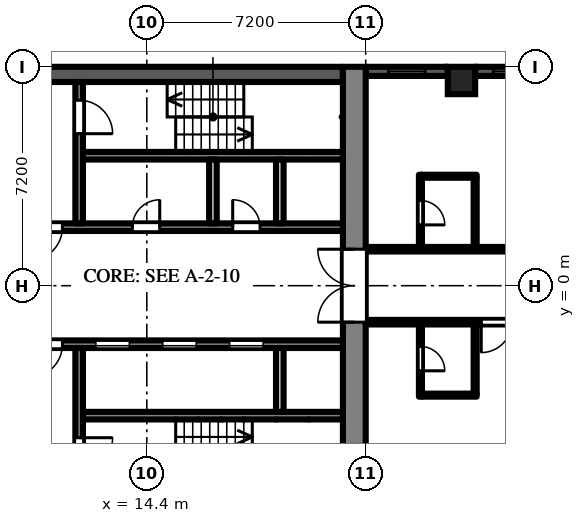
"""IFC4 building model, lengths in metres.
Left out: names, types, materials, properties, quantities, classifications, styles, units other than length and angle.
Written with IfcOpenShell. Run it as: python <this file> out.ifc"""

import sys

from ifc_helpers import new_model, si_unit, direction, frame, frame_2d, origin, origin_2d, place, context, subcontext, project, spatial, rectangle, extrude, element, fill, save


model = new_model("IFC4")
c1 = context("Model", 3, precision=1e-05, world=origin(), true_north=direction((0.0, 1.0)))
c2 = subcontext(c1, "Body", "Model", "MODEL_VIEW")
j1 = project(units=[si_unit("LENGTHUNIT", "METRE"), si_unit("PLANEANGLEUNIT", "RADIAN")], contexts=[c1])
p1 = place(None, origin())
s1 = spatial("IfcSite", under=j1, at=p1, CompositionType="ELEMENT")
p2 = place(p1, origin())
s2 = spatial("IfcBuilding", under=s1, at=p2, CompositionType="ELEMENT")
p3 = place(p2, frame((0.0, 0.0, 59.7)))
s3 = spatial("IfcBuildingStorey", under=s2, at=p3, CompositionType="ELEMENT", Elevation=59.7)
p4 = place(p3, frame((24.75, 6.75, 0.0), z_axis=(0.0, 0.0, 1.0), x_axis=(1.0, 0.0, 0.0)))
e1 = element("IfcColumn", 1, at=p4, inside=s3, PredefinedType="COLUMN", context=c2, shape_type="SweptSolid", body=[
    extrude(rectangle(XDim=0.9, YDim=0.9, at=origin_2d()), origin(), (0.0, 0.0, 1.0), 3.0),
])
p5 = place(p3, frame((28.35, 7.05, 0.0), z_axis=(0.0, 0.0, 1.0), x_axis=(-1.0, 0.0, 0.0)))
e2 = element("IfcWall", 2, at=p5, inside=s3, PredefinedType="SOLIDWALL", context=c2, shape_type="SweptSolid", body=[
    extrude(rectangle(XDim=3.15, YDim=0.3, at=frame_2d((1.575, 0.0))), origin(), (0.0, 0.0, 1.0), 2.1),
])
p6 = place(p5, frame((0.15, 0.0, 0.2)))
e3 = element("IfcOpeningElement", 3, at=p6, cuts=e2, PredefinedType="OPENING", context=c2, shape_type="SweptSolid", body=[
    extrude(rectangle(XDim=2.4, YDim=1.85, at=frame_2d((1.2, 0.925))), frame((0.0, 0.16, 0.0), z_axis=(0.0, -1.0, 0.0), x_axis=(1.0, 0.0, 0.0)), (0.0, 0.0, 1.0), 0.32),
])
p7 = place(p3, frame((24.3, 7.05, 0.0), z_axis=(0.0, 0.0, 1.0), x_axis=(-1.0, 0.0, 0.0)))
e4 = element("IfcWall", 4, at=p7, inside=s3, PredefinedType="SOLIDWALL", context=c2, shape_type="SweptSolid", body=[
    extrude(rectangle(XDim=2.7, YDim=0.3, at=frame_2d((1.35, 0.0))), origin(), (0.0, 0.0, 1.0), 2.1),
])
p8 = place(p7, frame((0.75, 0.0, 0.2)))
e5 = element("IfcOpeningElement", 5, at=p8, cuts=e4, PredefinedType="OPENING", context=c2, shape_type="SweptSolid", body=[
    extrude(rectangle(XDim=1.2, YDim=1.85, at=frame_2d((0.6, 0.925))), frame((0.0, 0.16, 0.0), z_axis=(0.0, -1.0, 0.0), x_axis=(1.0, 0.0, 0.0)), (0.0, 0.0, 1.0), 0.32),
])
p9 = place(p3, frame((21.225, -7.2, 0.0), z_axis=(0.0, 0.0, 1.0), x_axis=(0.0, 1.0, 0.0)))
e6 = element("IfcWall", 6, at=p9, inside=s3, PredefinedType="SHEAR", context=c2, shape_type="SweptSolid", body=[
    extrude(rectangle(XDim=14.4, YDim=0.75, at=frame_2d((7.2, 0.0))), origin(), (0.0, 0.0, 1.0), 2.55),
])
p10 = place(p9, frame((6.0, 0.0, 0.0)))
e7 = element("IfcOpeningElement", 7, at=p10, cuts=e6, PredefinedType="OPENING", context=c2, shape_type="SweptSolid", body=[
    extrude(rectangle(XDim=2.4, YDim=2.2, at=frame_2d((1.2, 1.1))), frame((0.0, 0.385, 0.0), z_axis=(0.0, -1.0, 0.0), x_axis=(1.0, 0.0, 0.0)), (0.0, 0.0, 1.0), 0.77),
])
p11 = place(p3, frame((7.9, 6.95, 0.0), z_axis=(0.0, 0.0, 1.0), x_axis=(1.0, 0.0, 0.0)))
e8 = element("IfcWall", 8, at=p11, inside=s3, PredefinedType="SHEAR", context=c2, shape_type="SweptSolid", body=[
    extrude(rectangle(XDim=12.95, YDim=0.5, at=frame_2d((6.475, 0.0))), origin(), (0.0, 0.0, 1.0), 2.55),
])
p12 = place(p3, frame((7.9, 1.925, 0.0), z_axis=(0.0, 0.0, 1.0), x_axis=(1.0, 0.0, 0.0)))
e9 = element("IfcWall", 9, at=p12, inside=s3, PredefinedType="SHEAR", context=c2, shape_type="SweptSolid", body=[
    extrude(rectangle(XDim=12.95, YDim=0.25, at=frame_2d((6.475, 0.0))), origin(), (0.0, 0.0, 1.0), 2.55),
])
p13 = place(p12, frame((0.525, 0.0, 0.0)))
e10 = element("IfcOpeningElement", 10, at=p13, cuts=e9, PredefinedType="OPENING", context=c2, shape_type="SweptSolid", body=[
    extrude(rectangle(XDim=0.9, YDim=2.1, at=frame_2d((0.45, 1.05))), frame((0.0, 0.135, 0.0), z_axis=(0.0, -1.0, 0.0), x_axis=(1.0, 0.0, 0.0)), (0.0, 0.0, 1.0), 0.27),
])
p14 = place(p12, frame((2.625, 0.0, 0.0)))
e11 = element("IfcOpeningElement", 11, at=p14, cuts=e9, PredefinedType="OPENING", context=c2, shape_type="SweptSolid", body=[
    extrude(rectangle(XDim=1.1, YDim=2.1, at=frame_2d((0.55, 1.05))), frame((0.0, 0.135, 0.0), z_axis=(0.0, -1.0, 0.0), x_axis=(1.0, 0.0, 0.0)), (0.0, 0.0, 1.0), 0.27),
])
p15 = place(p12, frame((6.025, 0.0, 0.0)))
e12 = element("IfcOpeningElement", 12, at=p15, cuts=e9, PredefinedType="OPENING", context=c2, shape_type="SweptSolid", body=[
    extrude(rectangle(XDim=0.9, YDim=2.1, at=frame_2d((0.45, 1.05))), frame((0.0, 0.135, 0.0), z_axis=(0.0, -1.0, 0.0), x_axis=(1.0, 0.0, 0.0)), (0.0, 0.0, 1.0), 0.27),
])
p16 = place(p12, frame((9.325, 0.0, 0.0)))
e13 = element("IfcOpeningElement", 13, at=p16, cuts=e9, PredefinedType="OPENING", context=c2, shape_type="SweptSolid", body=[
    extrude(rectangle(XDim=0.9, YDim=2.1, at=frame_2d((0.45, 1.05))), frame((0.0, 0.135, 0.0), z_axis=(0.0, -1.0, 0.0), x_axis=(1.0, 0.0, 0.0)), (0.0, 0.0, 1.0), 0.27),
])
p17 = place(p3, frame((12.3, 4.275, 0.0), z_axis=(0.0, 0.0, 1.0), x_axis=(1.0, 0.0, 0.0)))
e14 = element("IfcWall", 14, at=p17, inside=s3, PredefinedType="SHEAR", context=c2, shape_type="SweptSolid", body=[
    extrude(rectangle(XDim=8.55, YDim=0.25, at=frame_2d((4.275, 0.0))), origin(), (0.0, 0.0, 1.0), 2.55),
])
p18 = place(p3, frame((12.175, 2.05, 0.0), z_axis=(0.0, 0.0, 1.0), x_axis=(0.0, 1.0, 0.0)))
e15 = element("IfcWall", 15, at=p18, inside=s3, PredefinedType="SHEAR", context=c2, shape_type="SweptSolid", body=[
    extrude(rectangle(XDim=4.65, YDim=0.25, at=frame_2d((2.325, 0.0))), origin(), (0.0, 0.0, 1.0), 2.55),
])
p19 = place(p18, frame((2.95, 0.0, 0.0)))
e16 = element("IfcOpeningElement", 16, at=p19, cuts=e15, PredefinedType="OPENING", context=c2, shape_type="SweptSolid", body=[
    extrude(rectangle(XDim=1.1, YDim=2.1, at=frame_2d((0.55, 1.05))), frame((0.0, 0.135, 0.0), z_axis=(0.0, -1.0, 0.0), x_axis=(1.0, 0.0, 0.0)), (0.0, 0.0, 1.0), 0.27),
])
for number, where, z_axis, x_axis in (
    (17, (16.575, 2.05, 0.0), (0.0, 0.0, 1.0), (0.0, 1.0, 0.0)),
    (18, (18.775, 2.05, 0.0), (0.0, 0.0, 1.0), (0.0, 1.0, 0.0)),
):
    element("IfcWall", number, at=place(p3, frame(where, z_axis=z_axis, x_axis=x_axis)), inside=s3, PredefinedType="PARTITIONING", context=c2, shape_type="SweptSolid", body=[
        extrude(rectangle(XDim=2.1, YDim=0.25, at=frame_2d((1.05, 0.0))), origin(), (0.0, 0.0, 1.0), 2.55),
    ])
p20 = place(p3, frame((7.9, -1.925, 0.0), z_axis=(0.0, 0.0, 1.0), x_axis=(1.0, 0.0, 0.0)))
e19 = element("IfcWall", 19, at=p20, inside=s3, PredefinedType="SHEAR", context=c2, shape_type="SweptSolid", body=[
    extrude(rectangle(XDim=12.95, YDim=0.25, at=frame_2d((6.475, 0.0))), origin(), (0.0, 0.0, 1.0), 2.55),
])
p21 = place(p20, frame((4.825, 0.0, 0.0)))
e20 = element("IfcOpeningElement", 20, at=p21, cuts=e19, PredefinedType="OPENING", context=c2, shape_type="SweptSolid", body=[
    extrude(rectangle(XDim=1.1, YDim=2.1, at=frame_2d((0.55, 1.05))), frame((0.0, 0.135, 0.0), z_axis=(0.0, -1.0, 0.0), x_axis=(1.0, 0.0, 0.0)), (0.0, 0.0, 1.0), 0.27),
])
p22 = place(p20, frame((7.025, 0.0, 0.0)))
e21 = element("IfcOpeningElement", 21, at=p22, cuts=e19, PredefinedType="OPENING", context=c2, shape_type="SweptSolid", body=[
    extrude(rectangle(XDim=1.1, YDim=2.1, at=frame_2d((0.55, 1.05))), frame((0.0, 0.135, 0.0), z_axis=(0.0, -1.0, 0.0), x_axis=(1.0, 0.0, 0.0)), (0.0, 0.0, 1.0), 0.27),
])
p23 = place(p20, frame((9.225, 0.0, 0.0)))
e22 = element("IfcOpeningElement", 22, at=p23, cuts=e19, PredefinedType="OPENING", context=c2, shape_type="SweptSolid", body=[
    extrude(rectangle(XDim=1.1, YDim=2.1, at=frame_2d((0.55, 1.05))), frame((0.0, 0.135, 0.0), z_axis=(0.0, -1.0, 0.0), x_axis=(1.0, 0.0, 0.0)), (0.0, 0.0, 1.0), 0.27),
])
p24 = place(p20, frame((0.525, 0.0, 0.0)))
e23 = element("IfcOpeningElement", 23, at=p24, cuts=e19, PredefinedType="OPENING", context=c2, shape_type="SweptSolid", body=[
    extrude(rectangle(XDim=0.9, YDim=2.1, at=frame_2d((0.45, 1.05))), frame((0.0, 0.135, 0.0), z_axis=(0.0, -1.0, 0.0), x_axis=(1.0, 0.0, 0.0)), (0.0, 0.0, 1.0), 0.27),
])
p25 = place(p20, frame((2.625, 0.0, 0.0)))
e24 = element("IfcOpeningElement", 24, at=p25, cuts=e19, PredefinedType="OPENING", context=c2, shape_type="SweptSolid", body=[
    extrude(rectangle(XDim=1.1, YDim=2.1, at=frame_2d((0.55, 1.05))), frame((0.0, 0.135, 0.0), z_axis=(0.0, -1.0, 0.0), x_axis=(1.0, 0.0, 0.0)), (0.0, 0.0, 1.0), 0.27),
])
p26 = place(p3, frame((12.3, -4.275, 0.0), z_axis=(0.0, 0.0, 1.0), x_axis=(1.0, 0.0, 0.0)))
e25 = element("IfcWall", 25, at=p26, inside=s3, PredefinedType="SHEAR", context=c2, shape_type="SweptSolid", body=[
    extrude(rectangle(XDim=8.55, YDim=0.25, at=frame_2d((4.275, 0.0))), origin(), (0.0, 0.0, 1.0), 2.55),
])
p27 = place(p3, frame((12.175, -2.05, 0.0), z_axis=(0.0, 0.0, 1.0), x_axis=(0.0, -1.0, 0.0)))
e26 = element("IfcWall", 26, at=p27, inside=s3, PredefinedType="SHEAR", context=c2, shape_type="SweptSolid", body=[
    extrude(rectangle(XDim=4.65, YDim=0.25, at=frame_2d((2.325, 0.0))), origin(), (0.0, 0.0, 1.0), 2.55),
])
p28 = place(p27, frame((2.95, 0.0, 0.0)))
e27 = element("IfcOpeningElement", 27, at=p28, cuts=e26, PredefinedType="OPENING", context=c2, shape_type="SweptSolid", body=[
    extrude(rectangle(XDim=1.1, YDim=2.1, at=frame_2d((0.55, 1.05))), frame((0.0, 0.135, 0.0), z_axis=(0.0, -1.0, 0.0), x_axis=(1.0, 0.0, 0.0)), (0.0, 0.0, 1.0), 0.27),
])
p29 = place(p3, frame((18.775, -2.05, 0.0), z_axis=(0.0, 0.0, 1.0), x_axis=(0.0, -1.0, 0.0)))
e28 = element("IfcWall", 28, at=p29, inside=s3, PredefinedType="PARTITIONING", context=c2, shape_type="SweptSolid", body=[
    extrude(rectangle(XDim=2.1, YDim=0.25, at=frame_2d((1.05, 0.0))), origin(), (0.0, 0.0, 1.0), 2.55),
])
p30 = place(p3, frame((21.6, -1.2, 0.0), z_axis=(0.0, 0.0, 1.0), x_axis=(1.0, 0.0, 0.0)))
e29 = element("IfcWall", 29, at=p30, inside=s3, PredefinedType="PARTITIONING", context=c2, shape_type="SweptSolid", body=[
    extrude(rectangle(XDim=14.9, YDim=0.15, at=frame_2d((7.45, 0.0))), origin(), (0.0, 0.0, 1.0), 2.55),
])
p31 = place(p30, frame((3.8, 0.0, 0.0)))
e30 = element("IfcOpeningElement", 30, at=p31, cuts=e29, PredefinedType="OPENING", context=c2, shape_type="SweptSolid", body=[
    extrude(rectangle(XDim=1.0, YDim=2.1, at=frame_2d((0.5, 1.05))), frame((0.0, 0.085, 0.0), z_axis=(0.0, -1.0, 0.0), x_axis=(1.0, 0.0, 0.0)), (0.0, 0.0, 1.0), 0.17),
])
p32 = place(p30, frame((9.2, 0.0, 0.0)))
e31 = element("IfcOpeningElement", 31, at=p32, cuts=e29, PredefinedType="OPENING", context=c2, shape_type="SweptSolid", body=[
    extrude(rectangle(XDim=1.0, YDim=2.1, at=frame_2d((0.5, 1.05))), frame((0.0, 0.085, 0.0), z_axis=(0.0, -1.0, 0.0), x_axis=(1.0, 0.0, 0.0)), (0.0, 0.0, 1.0), 0.17),
])
p33 = place(p30, frame((11.95, 0.0, 0.0)))
e32 = element("IfcOpeningElement", 32, at=p33, cuts=e29, PredefinedType="OPENING", context=c2, shape_type="SweptSolid", body=[
    extrude(rectangle(XDim=1.8, YDim=2.1, at=frame_2d((0.9, 1.05))), frame((0.0, 0.085, 0.0), z_axis=(0.0, -1.0, 0.0), x_axis=(1.0, 0.0, 0.0)), (0.0, 0.0, 1.0), 0.17),
])
p34 = place(p3, frame((21.6, 1.2, 0.0), z_axis=(0.0, 0.0, 1.0), x_axis=(1.0, 0.0, 0.0)))
e33 = element("IfcWall", 33, at=p34, inside=s3, PredefinedType="PARTITIONING", context=c2, shape_type="SweptSolid", body=[
    extrude(rectangle(XDim=14.9, YDim=0.15, at=frame_2d((7.45, 0.0))), origin(), (0.0, 0.0, 1.0), 2.55),
])
p35 = place(p34, frame((6.0, 0.0, 0.0)))
e34 = element("IfcOpeningElement", 34, at=p35, cuts=e33, PredefinedType="OPENING", context=c2, shape_type="SweptSolid", body=[
    extrude(rectangle(XDim=1.0, YDim=2.1, at=frame_2d((0.5, 1.05))), frame((0.0, 0.085, 0.0), z_axis=(0.0, -1.0, 0.0), x_axis=(1.0, 0.0, 0.0)), (0.0, 0.0, 1.0), 0.17),
])
p36 = place(p34, frame((7.65, 0.0, 0.0)))
e35 = element("IfcOpeningElement", 35, at=p36, cuts=e33, PredefinedType="OPENING", context=c2, shape_type="SweptSolid", body=[
    extrude(rectangle(XDim=0.9, YDim=2.1, at=frame_2d((0.45, 1.05))), frame((0.0, 0.085, 0.0), z_axis=(0.0, -1.0, 0.0), x_axis=(1.0, 0.0, 0.0)), (0.0, 0.0, 1.0), 0.17),
])
p37 = place(p34, frame((9.45, 0.0, 0.0)))
e36 = element("IfcOpeningElement", 36, at=p37, cuts=e33, PredefinedType="OPENING", context=c2, shape_type="SweptSolid", body=[
    extrude(rectangle(XDim=0.9, YDim=2.1, at=frame_2d((0.45, 1.05))), frame((0.0, 0.085, 0.0), z_axis=(0.0, -1.0, 0.0), x_axis=(1.0, 0.0, 0.0)), (0.0, 0.0, 1.0), 0.17),
])
p38 = place(p34, frame((11.95, 0.0, 0.0)))
e37 = element("IfcOpeningElement", 37, at=p38, cuts=e33, PredefinedType="OPENING", context=c2, shape_type="SweptSolid", body=[
    extrude(rectangle(XDim=1.8, YDim=2.1, at=frame_2d((0.9, 1.05))), frame((0.0, 0.085, 0.0), z_axis=(0.0, -1.0, 0.0), x_axis=(1.0, 0.0, 0.0)), (0.0, 0.0, 1.0), 0.17),
])
p39 = place(p3, frame((23.4, -3.65, 0.0), z_axis=(0.0, 0.0, 1.0), x_axis=(0.0, 1.0, 0.0)))
e38 = element("IfcWall", 38, at=p39, inside=s3, PredefinedType="PARTITIONING", context=c2, shape_type="SweptSolid", body=[
    extrude(rectangle(XDim=2.375, YDim=0.1, at=frame_2d((1.188, 0.0))), origin(), (0.0, 0.0, 1.0), 2.55),
])
p40 = place(p39, frame((0.85, 0.0, 0.0)))
e39 = element("IfcOpeningElement", 39, at=p40, cuts=e38, PredefinedType="OPENING", context=c2, shape_type="SweptSolid", body=[
    extrude(rectangle(XDim=0.8, YDim=2.1, at=frame_2d((0.4, 1.05))), frame((0.0, 0.06, 0.0), z_axis=(0.0, -1.0, 0.0), x_axis=(1.0, 0.0, 0.0)), (0.0, 0.0, 1.0), 0.12),
])
p41 = place(p3, frame((23.45, -3.6, 0.0), z_axis=(0.0, 0.0, 1.0), x_axis=(1.0, 0.0, 0.0)))
e40 = element("IfcWall", 40, at=p41, inside=s3, PredefinedType="PARTITIONING", context=c2, shape_type="SweptSolid", body=[
    extrude(rectangle(XDim=1.8, YDim=0.1, at=frame_2d((0.9, 0.0))), origin(), (0.0, 0.0, 1.0), 2.55),
])
p42 = place(p3, frame((23.4, 1.275, 0.0), z_axis=(0.0, 0.0, 1.0), x_axis=(0.0, 1.0, 0.0)))
e41 = element("IfcWall", 41, at=p42, inside=s3, PredefinedType="PARTITIONING", context=c2, shape_type="SweptSolid", body=[
    extrude(rectangle(XDim=2.375, YDim=0.1, at=frame_2d((1.188, 0.0))), origin(), (0.0, 0.0, 1.0), 2.55),
])
p43 = place(p42, frame((0.725, 0.0, 0.0)))
e42 = element("IfcOpeningElement", 42, at=p43, cuts=e41, PredefinedType="OPENING", context=c2, shape_type="SweptSolid", body=[
    extrude(rectangle(XDim=0.8, YDim=2.1, at=frame_2d((0.4, 1.05))), frame((0.0, 0.06, 0.0), z_axis=(0.0, -1.0, 0.0), x_axis=(1.0, 0.0, 0.0)), (0.0, 0.0, 1.0), 0.12),
])
p44 = place(p3, frame((23.45, 3.6, 0.0), z_axis=(0.0, 0.0, 1.0), x_axis=(1.0, 0.0, 0.0)))
e43 = element("IfcWall", 43, at=p44, inside=s3, PredefinedType="PARTITIONING", context=c2, shape_type="SweptSolid", body=[
    extrude(rectangle(XDim=1.8, YDim=0.1, at=frame_2d((0.9, 0.0))), origin(), (0.0, 0.0, 1.0), 2.55),
])
for number, where, z_axis, x_axis in (
    (44, (25.2, -3.55, 0.0), (0.0, 0.0, 1.0), (0.0, 1.0, 0.0)),
    (45, (25.2, 1.275, 0.0), (0.0, 0.0, 1.0), (0.0, 1.0, 0.0)),
):
    element("IfcWall", number, at=place(p3, frame(where, z_axis=z_axis, x_axis=x_axis)), inside=s3, PredefinedType="PARTITIONING", context=c2, shape_type="SweptSolid", body=[
        extrude(rectangle(XDim=2.275, YDim=0.1, at=frame_2d((1.138, 0.0))), origin(), (0.0, 0.0, 1.0), 2.55),
    ])
p45 = place(p6, origin())
e46 = element("IfcWindow", 46, at=p45, inside=s3, PartitioningType="SINGLE_PANEL", PredefinedType="WINDOW", context=c2, shape_type="SweptSolid", body=[
    extrude(rectangle(XDim=2.4, YDim=1.85, at=frame_2d((1.2, 0.925))), frame((0.0, 0.03, 0.0), z_axis=(0.0, -1.0, 0.0), x_axis=(1.0, 0.0, 0.0)), (0.0, 0.0, 1.0), 0.06),
])
fill(e3, e46)
p46 = place(p8, origin())
e47 = element("IfcWindow", 47, at=p46, inside=s3, PartitioningType="SINGLE_PANEL", PredefinedType="WINDOW", context=c2, shape_type="SweptSolid", body=[
    extrude(rectangle(XDim=1.2, YDim=1.85, at=frame_2d((0.6, 0.925))), frame((0.0, 0.03, 0.0), z_axis=(0.0, -1.0, 0.0), x_axis=(1.0, 0.0, 0.0)), (0.0, 0.0, 1.0), 0.06),
])
fill(e5, e47)
p47 = place(p21, origin())
e48 = element("IfcDoor", 48, at=p47, inside=s3, OperationType="SLIDING_TO_LEFT", PredefinedType="DOOR", context=c2, shape_type="SweptSolid", body=[
    extrude(rectangle(XDim=1.1, YDim=2.1, at=frame_2d((0.55, 1.05))), frame((0.0, 0.025, 0.0), z_axis=(0.0, -1.0, 0.0), x_axis=(1.0, 0.0, 0.0)), (0.0, 0.0, 1.0), 0.05),
])
fill(e20, e48)
p48 = place(p22, origin())
e49 = element("IfcDoor", 49, at=p48, inside=s3, OperationType="SLIDING_TO_LEFT", PredefinedType="DOOR", context=c2, shape_type="SweptSolid", body=[
    extrude(rectangle(XDim=1.1, YDim=2.1, at=frame_2d((0.55, 1.05))), frame((0.0, 0.025, 0.0), z_axis=(0.0, -1.0, 0.0), x_axis=(1.0, 0.0, 0.0)), (0.0, 0.0, 1.0), 0.05),
])
fill(e21, e49)
p49 = place(p23, origin())
e50 = element("IfcDoor", 50, at=p49, inside=s3, OperationType="SLIDING_TO_LEFT", PredefinedType="DOOR", context=c2, shape_type="SweptSolid", body=[
    extrude(rectangle(XDim=1.1, YDim=2.1, at=frame_2d((0.55, 1.05))), frame((0.0, 0.025, 0.0), z_axis=(0.0, -1.0, 0.0), x_axis=(1.0, 0.0, 0.0)), (0.0, 0.0, 1.0), 0.05),
])
fill(e22, e50)
p50 = place(p19, frame((1.1, 0.0, 0.0), z_axis=(0.0, 0.0, 1.0), x_axis=(-1.0, 0.0, 0.0)))
e51 = element("IfcDoor", 51, at=p50, inside=s3, OperationType="SINGLE_SWING_RIGHT", PredefinedType="DOOR", context=c2, shape_type="SweptSolid", body=[
    extrude(rectangle(XDim=1.1, YDim=2.1, at=frame_2d((0.55, 1.05))), frame((0.0, 0.025, 0.0), z_axis=(0.0, -1.0, 0.0), x_axis=(1.0, 0.0, 0.0)), (0.0, 0.0, 1.0), 0.05),
])
fill(e16, e51)
p51 = place(p28, origin())
e52 = element("IfcDoor", 52, at=p51, inside=s3, OperationType="SINGLE_SWING_LEFT", PredefinedType="DOOR", context=c2, shape_type="SweptSolid", body=[
    extrude(rectangle(XDim=1.1, YDim=2.1, at=frame_2d((0.55, 1.05))), frame((0.0, 0.025, 0.0), z_axis=(0.0, -1.0, 0.0), x_axis=(1.0, 0.0, 0.0)), (0.0, 0.0, 1.0), 0.05),
])
fill(e27, e52)
p52 = place(p14, frame((1.1, 0.0, 0.0), z_axis=(0.0, 0.0, 1.0), x_axis=(-1.0, 0.0, 0.0)))
e53 = element("IfcDoor", 53, at=p52, inside=s3, OperationType="SINGLE_SWING_RIGHT", PredefinedType="DOOR", context=c2, shape_type="SweptSolid", body=[
    extrude(rectangle(XDim=1.1, YDim=2.1, at=frame_2d((0.55, 1.05))), frame((0.0, 0.025, 0.0), z_axis=(0.0, -1.0, 0.0), x_axis=(1.0, 0.0, 0.0)), (0.0, 0.0, 1.0), 0.05),
])
fill(e11, e53)
p53 = place(p25, frame((1.1, 0.0, 0.0), z_axis=(0.0, 0.0, 1.0), x_axis=(-1.0, 0.0, 0.0)))
e54 = element("IfcDoor", 54, at=p53, inside=s3, OperationType="SINGLE_SWING_RIGHT", PredefinedType="DOOR", context=c2, shape_type="SweptSolid", body=[
    extrude(rectangle(XDim=1.1, YDim=2.1, at=frame_2d((0.55, 1.05))), frame((0.0, 0.025, 0.0), z_axis=(0.0, -1.0, 0.0), x_axis=(1.0, 0.0, 0.0)), (0.0, 0.0, 1.0), 0.05),
])
fill(e24, e54)
p54 = place(p10, origin())
e55 = element("IfcDoor", 55, at=p54, inside=s3, OperationType="DOUBLE_DOOR_DOUBLE_SWING", PredefinedType="DOOR", context=c2, shape_type="SweptSolid", body=[
    extrude(rectangle(XDim=2.4, YDim=2.2, at=frame_2d((1.2, 1.1))), frame((0.0, 0.025, 0.0), z_axis=(0.0, -1.0, 0.0), x_axis=(1.0, 0.0, 0.0)), (0.0, 0.0, 1.0), 0.05),
])
fill(e7, e55)
p55 = place(p15, origin())
e56 = element("IfcDoor", 56, at=p55, inside=s3, OperationType="SINGLE_SWING_RIGHT", PredefinedType="DOOR", context=c2, shape_type="SweptSolid", body=[
    extrude(rectangle(XDim=0.9, YDim=2.1, at=frame_2d((0.45, 1.05))), frame((0.0, 0.025, 0.0), z_axis=(0.0, -1.0, 0.0), x_axis=(1.0, 0.0, 0.0)), (0.0, 0.0, 1.0), 0.05),
])
fill(e12, e56)
p56 = place(p16, origin())
e57 = element("IfcDoor", 57, at=p56, inside=s3, OperationType="SINGLE_SWING_LEFT", PredefinedType="DOOR", context=c2, shape_type="SweptSolid", body=[
    extrude(rectangle(XDim=0.9, YDim=2.1, at=frame_2d((0.45, 1.05))), frame((0.0, 0.025, 0.0), z_axis=(0.0, -1.0, 0.0), x_axis=(1.0, 0.0, 0.0)), (0.0, 0.0, 1.0), 0.05),
])
fill(e13, e57)
p57 = place(p43, frame((0.8, 0.0, 0.0), z_axis=(0.0, 0.0, 1.0), x_axis=(-1.0, 0.0, 0.0)))
e58 = element("IfcDoor", 58, at=p57, inside=s3, OperationType="SINGLE_SWING_RIGHT", PredefinedType="DOOR", context=c2, shape_type="SweptSolid", body=[
    extrude(rectangle(XDim=0.8, YDim=2.1, at=frame_2d((0.4, 1.05))), frame((0.0, 0.025, 0.0), z_axis=(0.0, -1.0, 0.0), x_axis=(1.0, 0.0, 0.0)), (0.0, 0.0, 1.0), 0.05),
])
fill(e42, e58)
p58 = place(p40, frame((0.8, 0.0, 0.0), z_axis=(0.0, 0.0, 1.0), x_axis=(-1.0, 0.0, 0.0)))
e59 = element("IfcDoor", 59, at=p58, inside=s3, OperationType="SINGLE_SWING_RIGHT", PredefinedType="DOOR", context=c2, shape_type="SweptSolid", body=[
    extrude(rectangle(XDim=0.8, YDim=2.1, at=frame_2d((0.4, 1.05))), frame((0.0, 0.025, 0.0), z_axis=(0.0, -1.0, 0.0), x_axis=(1.0, 0.0, 0.0)), (0.0, 0.0, 1.0), 0.05),
])
fill(e39, e59)
p59 = place(p31, frame((1.0, 0.0, 0.0), z_axis=(0.0, 0.0, 1.0), x_axis=(-1.0, 0.0, 0.0)))
e60 = element("IfcDoor", 60, at=p59, inside=s3, OperationType="SINGLE_SWING_RIGHT", PredefinedType="DOOR", context=c2, shape_type="SweptSolid", body=[
    extrude(rectangle(XDim=1.0, YDim=2.1, at=frame_2d((0.5, 1.05))), frame((0.0, 0.025, 0.0), z_axis=(0.0, -1.0, 0.0), x_axis=(1.0, 0.0, 0.0)), (0.0, 0.0, 1.0), 0.05),
])
fill(e30, e60)
save(model, sys.argv[1])
